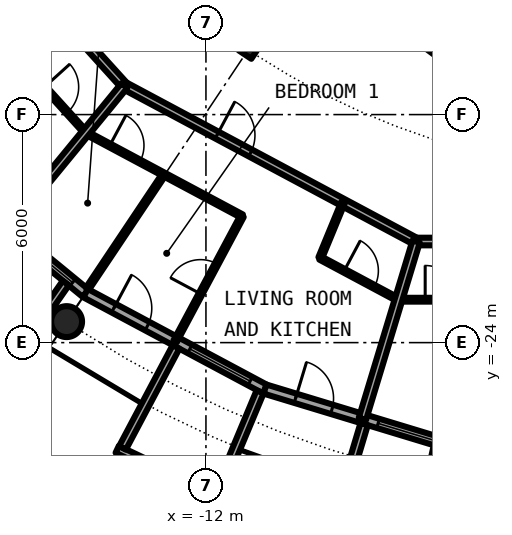
"""IFC4 building model, lengths in metres.
Left out: names, types, materials, properties, quantities, classifications, styles, units other than length and angle.
Written with IfcOpenShell. Run it as: python <this file> out.ifc"""

import sys

from ifc_helpers import new_model, si_unit, direction, frame, frame_2d, origin, origin_2d, place, context, subcontext, project, spatial, rectangle, circle, hollow_circle, i_section, extrude, element, fill, save


model = new_model("IFC4")
c1 = context("Model", 3, precision=1e-05, world=origin(), true_north=direction((0.0, 1.0)))
c2 = subcontext(c1, "Body", "Model", "MODEL_VIEW")
j1 = project(units=[si_unit("LENGTHUNIT", "METRE"), si_unit("PLANEANGLEUNIT", "RADIAN")], contexts=[c1])
p1 = place(None, origin())
s1 = spatial("IfcSite", under=j1, at=p1, CompositionType="ELEMENT")
p2 = place(p1, origin())
s2 = spatial("IfcBuilding", under=s1, at=p2, CompositionType="ELEMENT")
p3 = place(p2, frame((0.0, 0.0, 218.8)))
s3 = spatial("IfcBuildingStorey", under=s2, at=p3, CompositionType="ELEMENT", Elevation=218.8)
p4 = place(p3, frame((-15.667, -23.448, 0.0), z_axis=(0.0, 0.0, 1.0), x_axis=(1.0, 0.0, 0.0)))
e1 = element("IfcColumn", 1, at=p4, inside=s3, PredefinedType="COLUMN", context=c2, shape_type="SweptSolid", body=[
    extrude(hollow_circle(Radius=0.406, WallThickness=0.03, at=origin_2d()), origin(), (0.0, 0.0, 1.0), 3.05),
])
p5 = place(p3, frame((-10.889, -16.297, 0.0), z_axis=(0.0, 0.0, 1.0), x_axis=(-0.55557023302, -0.831469612303, 0.0)))
e2 = element("IfcColumn", 2, at=p5, inside=s3, PredefinedType="COLUMN", context=c2, shape_type="SweptSolid", body=[
    extrude(i_section(OverallWidth=0.3, OverallDepth=0.4, WebThickness=0.013, FlangeThickness=0.024, FilletRadius=0.027, at=origin_2d()), origin(), (0.0, 0.0, 1.0), 3.05),
])
p6 = place(p3, frame((-19.304, -19.304, 0.0), z_axis=(0.0, 0.0, 1.0), x_axis=(0.773019449054, -0.634382322723, 0.0)))
e3 = element("IfcWall", 3, at=p6, inside=s3, PredefinedType="SOLIDWALL", context=c2, shape_type="SweptSolid", body=[
    extrude(rectangle(XDim=5.352, YDim=0.25, at=frame_2d((2.676, 0.0))), origin(), (0.0, 0.0, 1.0), 2.65),
])
p7 = place(p6, frame((0.841, 0.0, 0.0)))
e4 = element("IfcOpeningElement", 4, at=p7, cuts=e3, PredefinedType="OPENING", context=c2, shape_type="SweptSolid", body=[
    extrude(rectangle(XDim=1.0, YDim=2.2, at=frame_2d((0.5, 1.1))), frame((0.0, 0.135, 0.0), z_axis=(0.0, -1.0, 0.0), x_axis=(1.0, 0.0, 0.0)), (0.0, 0.0, 1.0), 0.27),
])
p8 = place(p6, frame((3.111, 0.0, 0.3)))
e5 = element("IfcOpeningElement", 5, at=p8, cuts=e3, PredefinedType="OPENING", context=c2, shape_type="SweptSolid", body=[
    extrude(rectangle(XDim=1.8, YDim=2.1, at=frame_2d((0.9, 1.05))), frame((0.0, 0.135, 0.0), z_axis=(0.0, -1.0, 0.0), x_axis=(1.0, 0.0, 0.0)), (0.0, 0.0, 1.0), 0.27),
])
p9 = place(p3, frame((-15.688, -22.433, -0.03), z_axis=(0.0, 0.0, 1.0), x_axis=(-0.573260687834, -0.819373043115, 0.0)))
e6 = element("IfcWall", 6, at=p9, inside=s3, PredefinedType="SOLIDWALL", context=c2, shape_type="SweptSolid", body=[
    extrude(rectangle(XDim=2.925, YDim=0.2, at=frame_2d((1.463, 0.0))), origin(), (0.0, 0.0, 1.0), 2.68),
])
p10 = place(p3, frame((-15.167, -22.699, 0.0), z_axis=(0.0, 0.0, 1.0), x_axis=(0.881915646801, -0.471407246368, 0.0)))
e7 = element("IfcWall", 7, at=p10, inside=s3, PredefinedType="SOLIDWALL", context=c2, shape_type="SweptSolid", body=[
    extrude(rectangle(XDim=5.352, YDim=0.25, at=frame_2d((2.676, 0.0))), origin(), (0.0, 0.0, 1.0), 2.65),
])
p11 = place(p10, frame((0.841, 0.0, 0.0)))
e8 = element("IfcOpeningElement", 8, at=p11, cuts=e7, PredefinedType="OPENING", context=c2, shape_type="SweptSolid", body=[
    extrude(rectangle(XDim=1.0, YDim=2.2, at=frame_2d((0.5, 1.1))), frame((0.0, 0.135, 0.0), z_axis=(0.0, -1.0, 0.0), x_axis=(1.0, 0.0, 0.0)), (0.0, 0.0, 1.0), 0.27),
])
p12 = place(p10, frame((3.111, 0.0, 0.3)))
e9 = element("IfcOpeningElement", 9, at=p12, cuts=e7, PredefinedType="OPENING", context=c2, shape_type="SweptSolid", body=[
    extrude(rectangle(XDim=1.8, YDim=2.1, at=frame_2d((0.9, 1.05))), frame((0.0, 0.135, 0.0), z_axis=(0.0, -1.0, 0.0), x_axis=(1.0, 0.0, 0.0)), (0.0, 0.0, 1.0), 0.27),
])
p13 = place(p3, frame((-14.335, -26.808, -0.03), z_axis=(0.0, 0.0, 1.0), x_axis=(0.904000060331, -0.427532327342, 0.0)))
e10 = element("IfcWall", 10, at=p13, inside=s3, PredefinedType="SOLIDWALL", context=c2, shape_type="SweptSolid", body=[
    extrude(rectangle(XDim=2.993, YDim=0.2, at=frame_2d((1.497, 0.0))), origin(), (0.0, 0.0, 1.0), 2.68),
])
p14 = place(p13, frame((0.457, 0.0, 0.33)))
e11 = element("IfcOpeningElement", 11, at=p14, cuts=e10, PredefinedType="OPENING", context=c2, shape_type="SweptSolid", body=[
    extrude(circle(Radius=1.04, at=frame_2d((1.04, 1.04))), frame((0.0, 0.11, 0.0), z_axis=(0.0, -1.0, 0.0), x_axis=(1.0, 0.0, 0.0)), (0.0, 0.0, 1.0), 0.22),
])
p15 = place(p3, frame((-12.787, -24.113, -0.03), z_axis=(0.0, 0.0, 1.0), x_axis=(-0.468365282436, -0.883534924159, 0.0)))
e12 = element("IfcWall", 12, at=p15, inside=s3, PredefinedType="SOLIDWALL", context=c2, shape_type="SweptSolid", body=[
    extrude(rectangle(XDim=3.006, YDim=0.2, at=frame_2d((1.503, 0.0))), origin(), (0.0, 0.0, 1.0), 2.68),
])
p16 = place(p3, frame((-10.575, -25.295, -0.03), z_axis=(0.0, 0.0, 1.0), x_axis=(-0.385697364644, -0.922625353492, 0.0)))
e13 = element("IfcWall", 13, at=p16, inside=s3, PredefinedType="SOLIDWALL", context=c2, shape_type="SweptSolid", body=[
    extrude(rectangle(XDim=2.883, YDim=0.2, at=frame_2d((1.442, 0.0))), origin(), (0.0, 0.0, 1.0), 2.68),
])
p17 = place(p3, frame((-10.447, -25.222, 0.0), z_axis=(0.0, 0.0, 1.0), x_axis=(0.956965678721, -0.290201119486, 0.0)))
e14 = element("IfcWall", 14, at=p17, inside=s3, PredefinedType="SOLIDWALL", context=c2, shape_type="SweptSolid", body=[
    extrude(rectangle(XDim=5.351, YDim=0.25, at=frame_2d((2.676, 0.0))), origin(), (0.0, 0.0, 1.0), 2.65),
])
p18 = place(p17, frame((0.841, 0.0, 0.0)))
e15 = element("IfcOpeningElement", 15, at=p18, cuts=e14, PredefinedType="OPENING", context=c2, shape_type="SweptSolid", body=[
    extrude(rectangle(XDim=1.0, YDim=2.2, at=frame_2d((0.5, 1.1))), frame((0.0, 0.135, 0.0), z_axis=(0.0, -1.0, 0.0), x_axis=(1.0, 0.0, 0.0)), (0.0, 0.0, 1.0), 0.27),
])
p19 = place(p17, frame((3.111, 0.0, 0.3)))
e16 = element("IfcOpeningElement", 16, at=p19, cuts=e14, PredefinedType="OPENING", context=c2, shape_type="SweptSolid", body=[
    extrude(rectangle(XDim=1.8, YDim=2.1, at=frame_2d((0.9, 1.05))), frame((0.0, 0.135, 0.0), z_axis=(0.0, -1.0, 0.0), x_axis=(1.0, 0.0, 0.0)), (0.0, 0.0, 1.0), 0.27),
])
p20 = place(p3, frame((-7.837, -26.144, -0.03), z_axis=(0.0, 0.0, 1.0), x_axis=(-0.287064767992, -0.957911174889, 0.0)))
e17 = element("IfcWall", 17, at=p20, inside=s3, PredefinedType="SOLIDWALL", context=c2, shape_type="SweptSolid", body=[
    extrude(rectangle(XDim=3.006, YDim=0.2, at=frame_2d((1.503, 0.0))), origin(), (0.0, 0.0, 1.0), 2.68),
])
p21 = place(p3, frame((-5.909, -26.729, -0.03), z_axis=(0.0, 0.0, 1.0), x_axis=(-0.216409053917, -0.976302781612, 0.0)))
e18 = element("IfcWall", 18, at=p21, inside=s3, PredefinedType="SOLIDWALL", context=c2, shape_type="SweptSolid", body=[
    extrude(rectangle(XDim=2.925, YDim=0.2, at=frame_2d((1.463, 0.0))), origin(), (0.0, 0.0, 1.0), 2.68),
])
p22 = place(p3, frame((-16.732, -16.743, 0.0), z_axis=(0.0, 0.0, 1.0), x_axis=(0.671528384412, -0.740978831634, 0.0)))
e19 = element("IfcWall", 19, at=p22, inside=s3, PredefinedType="PARTITIONING", context=c2, shape_type="SweptSolid", body=[
    extrude(rectangle(XDim=2.338, YDim=0.1, at=frame_2d((1.169, 0.0))), origin(), (0.0, 0.0, 1.0), 2.65),
])
p23 = place(p22, frame((0.719, 0.0, 0.0)))
e20 = element("IfcOpeningElement", 20, at=p23, cuts=e19, PredefinedType="OPENING", context=c2, shape_type="SweptSolid", body=[
    extrude(rectangle(XDim=0.9, YDim=2.3, at=frame_2d((0.45, 1.15))), frame((0.0, 0.06, 0.0), z_axis=(0.0, -1.0, 0.0), x_axis=(1.0, 0.0, 0.0)), (0.0, 0.0, 1.0), 0.12),
])
p24 = place(p3, frame((-15.162, -18.475, 0.0), z_axis=(0.0, 0.0, 1.0), x_axis=(0.881916280728, -0.471406060405, 0.0)))
e21 = element("IfcWall", 21, at=p24, inside=s3, PredefinedType="PARTITIONING", context=c2, shape_type="SweptSolid", body=[
    extrude(rectangle(XDim=4.663, YDim=0.1, at=frame_2d((2.331, 0.0))), origin(), (0.0, 0.0, 1.0), 2.65),
])
p25 = place(p24, frame((0.716, 0.0, 0.0)))
e22 = element("IfcOpeningElement", 22, at=p25, cuts=e21, PredefinedType="OPENING", context=c2, shape_type="SweptSolid", body=[
    extrude(rectangle(XDim=0.9, YDim=2.3, at=frame_2d((0.45, 1.15))), frame((0.0, 0.06, 0.0), z_axis=(0.0, -1.0, 0.0), x_axis=(1.0, 0.0, 0.0)), (0.0, 0.0, 1.0), 0.12),
])
p26 = place(p3, frame((-8.994, -21.772, 0.0), z_axis=(0.0, 0.0, 1.0), x_axis=(0.881882873346, -0.471468554305, 0.0)))
e23 = element("IfcWall", 23, at=p26, inside=s3, PredefinedType="PARTITIONING", context=c2, shape_type="SweptSolid", body=[
    extrude(rectangle(XDim=2.331, YDim=0.1, at=frame_2d((1.166, 0.0))), origin(), (0.0, 0.0, 1.0), 2.65),
])
p27 = place(p26, frame((0.716, 0.0, 0.0)))
e24 = element("IfcOpeningElement", 24, at=p27, cuts=e23, PredefinedType="OPENING", context=c2, shape_type="SweptSolid", body=[
    extrude(rectangle(XDim=0.9, YDim=2.3, at=frame_2d((0.45, 1.15))), frame((0.0, 0.06, 0.0), z_axis=(0.0, -1.0, 0.0), x_axis=(1.0, 0.0, 0.0)), (0.0, 0.0, 1.0), 0.12),
])
p28 = place(p3, frame((-6.938, -22.871, 0.0), z_axis=(0.0, 0.0, 1.0), x_axis=(1.0, 0.0, 0.0)))
e25 = element("IfcWall", 25, at=p28, inside=s3, PredefinedType="PARTITIONING", context=c2, shape_type="SweptSolid", body=[
    extrude(rectangle(XDim=2.313, YDim=0.1, at=frame_2d((1.156, 0.0))), origin(), (0.0, 0.0, 1.0), 2.65),
])
p29 = place(p28, frame((0.707, 0.0, 0.0)))
e26 = element("IfcOpeningElement", 26, at=p29, cuts=e25, PredefinedType="OPENING", context=c2, shape_type="SweptSolid", body=[
    extrude(rectangle(XDim=0.9, YDim=2.3, at=frame_2d((0.45, 1.15))), frame((0.0, 0.06, 0.0), z_axis=(0.0, -1.0, 0.0), x_axis=(1.0, 0.0, 0.0)), (0.0, 0.0, 1.0), 0.12),
])
p30 = place(p3, frame((-18.542, -12.389, 0.0), z_axis=(0.0, 0.0, 1.0), x_axis=(0.671561669125, -0.740948665268, 0.0)))
e27 = element("IfcWall", 27, at=p30, inside=s3, PredefinedType="PARTITIONING", context=c2, shape_type="SweptSolid", body=[
    extrude(rectangle(XDim=6.544, YDim=0.2, at=frame_2d((3.272, 0.0))), origin(), (0.0, 0.0, 1.0), 2.65),
])
p31 = place(p30, frame((1.682, 0.0, 0.0)))
e28 = element("IfcOpeningElement", 28, at=p31, cuts=e27, PredefinedType="OPENING", context=c2, shape_type="SweptSolid", body=[
    extrude(rectangle(XDim=1.0, YDim=2.3, at=frame_2d((0.5, 1.15))), frame((0.0, 0.11, 0.0), z_axis=(0.0, -1.0, 0.0), x_axis=(1.0, 0.0, 0.0)), (0.0, 0.0, 1.0), 0.22),
])
p32 = place(p3, frame((-14.147, -17.238, 0.0), z_axis=(0.0, 0.0, 1.0), x_axis=(0.881941116964, -0.471359593312, 0.0)))
e29 = element("IfcWall", 29, at=p32, inside=s3, PredefinedType="PARTITIONING", context=c2, shape_type="SweptSolid", body=[
    extrude(rectangle(XDim=8.705, YDim=0.2, at=frame_2d((4.352, 0.0))), origin(), (0.0, 0.0, 1.0), 2.65),
])
p33 = place(p32, frame((2.763, 0.0, 0.0)))
e30 = element("IfcOpeningElement", 30, at=p33, cuts=e29, PredefinedType="OPENING", context=c2, shape_type="SweptSolid", body=[
    extrude(rectangle(XDim=1.0, YDim=2.3, at=frame_2d((0.5, 1.15))), frame((0.0, 0.11, 0.0), z_axis=(0.0, -1.0, 0.0), x_axis=(1.0, 0.0, 0.0)), (0.0, 0.0, 1.0), 0.22),
])
p34 = place(p3, frame((-6.473, -21.34, 0.0), z_axis=(0.0, 0.0, 1.0), x_axis=(1.0, 0.0, 0.0)))
e31 = element("IfcWall", 31, at=p34, inside=s3, PredefinedType="PARTITIONING", context=c2, shape_type="SweptSolid", body=[
    extrude(rectangle(XDim=12.946, YDim=0.2, at=frame_2d((6.473, 0.0))), origin(), (0.0, 0.0, 1.0), 2.65),
])
p35 = place(p34, frame((7.051, 0.0, 0.0)))
e32 = element("IfcOpeningElement", 32, at=p35, cuts=e31, PredefinedType="OPENING", context=c2, shape_type="SweptSolid", body=[
    extrude(rectangle(XDim=1.0, YDim=2.3, at=frame_2d((0.5, 1.15))), frame((0.0, 0.11, 0.0), z_axis=(0.0, -1.0, 0.0), x_axis=(1.0, 0.0, 0.0)), (0.0, 0.0, 1.0), 0.22),
])
p36 = place(p3, frame((-14.718, -9.833, 0.0), z_axis=(0.0, 0.0, 1.0), x_axis=(0.803240181354, -0.595655278712, 0.0)))
e33 = element("IfcWall", 33, at=p36, inside=s3, PredefinedType="PARTITIONING", context=c2, shape_type="SweptSolid", body=[
    extrude(rectangle(XDim=11.928, YDim=0.2, at=frame_2d((5.964, 0.0))), origin(), (0.0, 0.0, 1.0), 2.65),
])
p37 = place(p36, frame((6.316, 0.0, 0.0)))
e34 = element("IfcOpeningElement", 34, at=p37, cuts=e33, PredefinedType="OPENING", context=c2, shape_type="SweptSolid", body=[
    extrude(rectangle(XDim=1.0, YDim=2.3, at=frame_2d((0.5, 1.15))), frame((0.0, 0.11, 0.0), z_axis=(0.0, -1.0, 0.0), x_axis=(1.0, 0.0, 0.0)), (0.0, 0.0, 1.0), 0.22),
])
p38 = place(p3, frame((-17.24, -21.007, 0.0), z_axis=(0.0, 0.0, 1.0), x_axis=(0.634374159378, 0.773026148273, 0.0)))
e35 = element("IfcWall", 35, at=p38, inside=s3, PredefinedType="PARTITIONING", context=c2, shape_type="SweptSolid", body=[
    extrude(rectangle(XDim=4.876, YDim=0.2, at=frame_2d((2.438, 0.0))), origin(), (0.0, 0.0, 1.0), 2.65),
])
p39 = place(p3, frame((-16.732, -16.743, 0.0), z_axis=(0.0, 0.0, 1.0), x_axis=(0.70679853939, 0.707414888673, 0.0)))
e36 = element("IfcWall", 36, at=p39, inside=s3, PredefinedType="PARTITIONING", context=c2, shape_type="SweptSolid", body=[
    extrude(rectangle(XDim=1.584, YDim=0.1, at=frame_2d((0.792, 0.0))), origin(), (0.0, 0.0, 1.0), 2.65),
])
p40 = place(p3, frame((-15.119, -22.581, 0.0), z_axis=(0.0, 0.0, 1.0), x_axis=(0.556271723484, 0.831000463088, 0.0)))
e37 = element("IfcWall", 37, at=p40, inside=s3, PredefinedType="PARTITIONING", context=c2, shape_type="SweptSolid", body=[
    extrude(rectangle(XDim=3.619, YDim=0.1, at=frame_2d((1.809, 0.0))), origin(), (0.0, 0.0, 1.0), 2.65),
])
p41 = place(p3, frame((-12.81, -23.966, 0.0), z_axis=(0.0, 0.0, 1.0), x_axis=(0.471372010014, 0.881934480659, 0.0)))
e38 = element("IfcWall", 38, at=p41, inside=s3, PredefinedType="PARTITIONING", context=c2, shape_type="SweptSolid", body=[
    extrude(rectangle(XDim=3.734, YDim=0.1, at=frame_2d((1.867, 0.0))), origin(), (0.0, 0.0, 1.0), 2.65),
])
p42 = place(p41, frame((1.417, 0.0, 0.0)))
e39 = element("IfcOpeningElement", 39, at=p42, cuts=e38, PredefinedType="OPENING", context=c2, shape_type="SweptSolid", body=[
    extrude(rectangle(XDim=0.9, YDim=2.3, at=frame_2d((0.45, 1.15))), frame((0.0, 0.06, 0.0), z_axis=(0.0, -1.0, 0.0), x_axis=(1.0, 0.0, 0.0)), (0.0, 0.0, 1.0), 0.12),
])
p43 = place(p3, frame((-8.994, -21.772, 0.0), z_axis=(0.0, 0.0, 1.0), x_axis=(0.381535938362, 0.924354005638, 0.0)))
e40 = element("IfcWall", 40, at=p43, inside=s3, PredefinedType="PARTITIONING", context=c2, shape_type="SweptSolid", body=[
    extrude(rectangle(XDim=1.577, YDim=0.1, at=frame_2d((0.789, 0.0))), origin(), (0.0, 0.0, 1.0), 2.65),
])
p44 = place(p3, frame((-7.883, -26.006, 0.0), z_axis=(0.0, 0.0, 1.0), x_axis=(0.290085236897, 0.957000812609, 0.0)))
e41 = element("IfcWall", 41, at=p44, inside=s3, PredefinedType="PARTITIONING", context=c2, shape_type="SweptSolid", body=[
    extrude(rectangle(XDim=4.875, YDim=0.2, at=frame_2d((2.438, 0.0))), origin(), (0.0, 0.0, 1.0), 2.65),
])
p45 = place(p8, origin())
e42 = element("IfcWindow", 42, at=p45, inside=s3, PartitioningType="SINGLE_PANEL", PredefinedType="WINDOW", context=c2, shape_type="SweptSolid", body=[
    extrude(rectangle(XDim=1.8, YDim=2.1, at=frame_2d((0.9, 1.05))), frame((0.0, 0.03, 0.0), z_axis=(0.0, -1.0, 0.0), x_axis=(1.0, 0.0, 0.0)), (0.0, 0.0, 1.0), 0.06),
])
fill(e5, e42)
p46 = place(p11, origin())
e43 = element("IfcDoor", 43, at=p46, inside=s3, OperationType="SINGLE_SWING_LEFT", PredefinedType="DOOR", context=c2, shape_type="SweptSolid", body=[
    extrude(rectangle(XDim=1.0, YDim=2.2, at=frame_2d((0.5, 1.1))), frame((0.0, 0.025, 0.0), z_axis=(0.0, -1.0, 0.0), x_axis=(1.0, 0.0, 0.0)), (0.0, 0.0, 1.0), 0.05),
])
fill(e8, e43)
p47 = place(p12, origin())
e44 = element("IfcWindow", 44, at=p47, inside=s3, PartitioningType="SINGLE_PANEL", PredefinedType="WINDOW", context=c2, shape_type="SweptSolid", body=[
    extrude(rectangle(XDim=1.8, YDim=2.1, at=frame_2d((0.9, 1.05))), frame((0.0, 0.03, 0.0), z_axis=(0.0, -1.0, 0.0), x_axis=(1.0, 0.0, 0.0)), (0.0, 0.0, 1.0), 0.06),
])
fill(e9, e44)
p48 = place(p18, origin())
e45 = element("IfcDoor", 45, at=p48, inside=s3, OperationType="SINGLE_SWING_LEFT", PredefinedType="DOOR", context=c2, shape_type="SweptSolid", body=[
    extrude(rectangle(XDim=1.0, YDim=2.2, at=frame_2d((0.5, 1.1))), frame((0.0, 0.025, 0.0), z_axis=(0.0, -1.0, 0.0), x_axis=(1.0, 0.0, 0.0)), (0.0, 0.0, 1.0), 0.05),
])
fill(e15, e45)
p49 = place(p19, origin())
e46 = element("IfcWindow", 46, at=p49, inside=s3, PartitioningType="SINGLE_PANEL", PredefinedType="WINDOW", context=c2, shape_type="SweptSolid", body=[
    extrude(rectangle(XDim=1.8, YDim=2.1, at=frame_2d((0.9, 1.05))), frame((0.0, 0.03, 0.0), z_axis=(0.0, -1.0, 0.0), x_axis=(1.0, 0.0, 0.0)), (0.0, 0.0, 1.0), 0.06),
])
fill(e16, e46)
p50 = place(p23, origin())
e47 = element("IfcDoor", 47, at=p50, inside=s3, OperationType="SINGLE_SWING_LEFT", PredefinedType="DOOR", context=c2, shape_type="SweptSolid", body=[
    extrude(rectangle(XDim=0.9, YDim=2.3, at=frame_2d((0.45, 1.15))), frame((0.0, 0.025, 0.0), z_axis=(0.0, -1.0, 0.0), x_axis=(1.0, 0.0, 0.0)), (0.0, 0.0, 1.0), 0.05),
])
fill(e20, e47)
p51 = place(p33, origin())
e48 = element("IfcDoor", 48, at=p51, inside=s3, OperationType="SINGLE_SWING_LEFT", PredefinedType="DOOR", context=c2, shape_type="SweptSolid", body=[
    extrude(rectangle(XDim=1.0, YDim=2.3, at=frame_2d((0.5, 1.15))), frame((0.0, 0.025, 0.0), z_axis=(0.0, -1.0, 0.0), x_axis=(1.0, 0.0, 0.0)), (0.0, 0.0, 1.0), 0.05),
])
fill(e30, e48)
p52 = place(p27, origin())
e49 = element("IfcDoor", 49, at=p52, inside=s3, OperationType="SINGLE_SWING_RIGHT", PredefinedType="DOOR", context=c2, shape_type="SweptSolid", body=[
    extrude(rectangle(XDim=0.9, YDim=2.3, at=frame_2d((0.45, 1.15))), frame((0.0, 0.025, 0.0), z_axis=(0.0, -1.0, 0.0), x_axis=(1.0, 0.0, 0.0)), (0.0, 0.0, 1.0), 0.05),
])
fill(e24, e49)
p53 = place(p42, origin())
e50 = element("IfcDoor", 50, at=p53, inside=s3, OperationType="SINGLE_SWING_RIGHT", PredefinedType="DOOR", context=c2, shape_type="SweptSolid", body=[
    extrude(rectangle(XDim=0.9, YDim=2.3, at=frame_2d((0.45, 1.15))), frame((0.0, 0.025, 0.0), z_axis=(0.0, -1.0, 0.0), x_axis=(1.0, 0.0, 0.0)), (0.0, 0.0, 1.0), 0.05),
])
fill(e39, e50)
p54 = place(p25, origin())
e51 = element("IfcDoor", 51, at=p54, inside=s3, OperationType="SINGLE_SWING_LEFT", PredefinedType="DOOR", context=c2, shape_type="SweptSolid", body=[
    extrude(rectangle(XDim=0.9, YDim=2.3, at=frame_2d((0.45, 1.15))), frame((0.0, 0.025, 0.0), z_axis=(0.0, -1.0, 0.0), x_axis=(1.0, 0.0, 0.0)), (0.0, 0.0, 1.0), 0.05),
])
fill(e22, e51)
p55 = place(p29, origin())
e52 = element("IfcDoor", 52, at=p55, inside=s3, OperationType="SINGLE_SWING_RIGHT", PredefinedType="DOOR", context=c2, shape_type="SweptSolid", body=[
    extrude(rectangle(XDim=0.9, YDim=2.3, at=frame_2d((0.45, 1.15))), frame((0.0, 0.025, 0.0), z_axis=(0.0, -1.0, 0.0), x_axis=(1.0, 0.0, 0.0)), (0.0, 0.0, 1.0), 0.05),
])
fill(e26, e52)
save(model, sys.argv[1])
